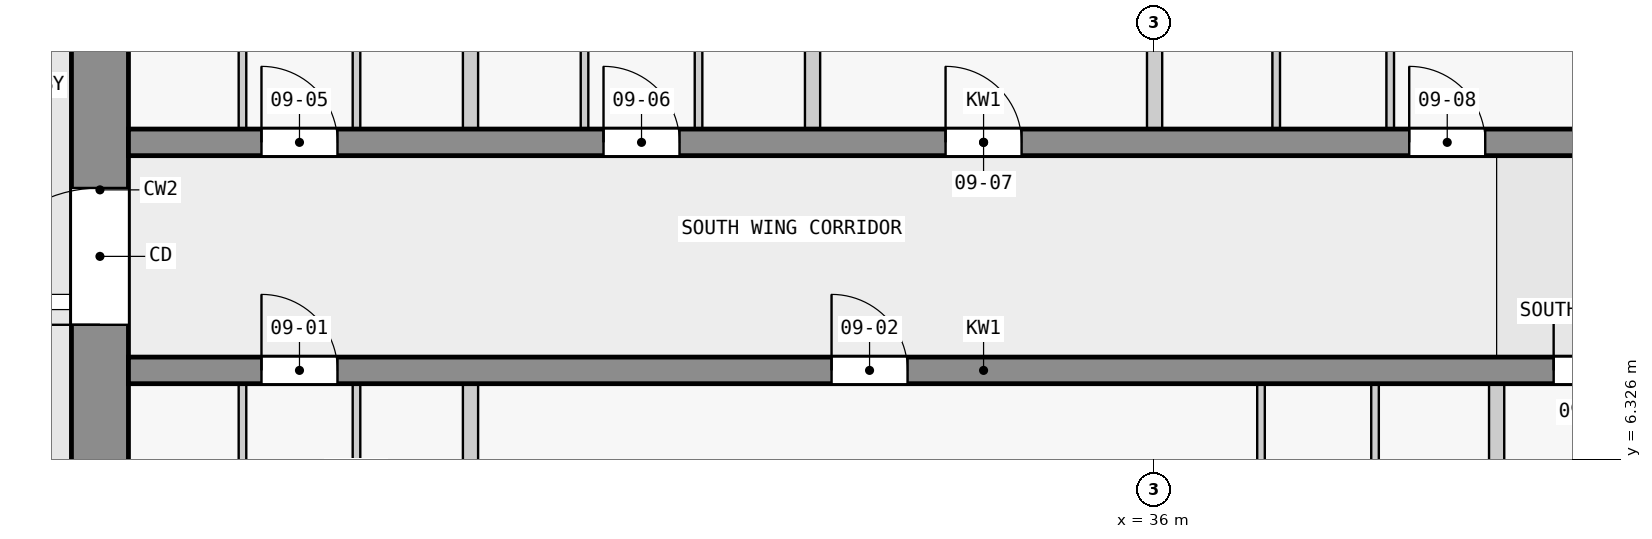
"""IFC4 building model, lengths in metres.
Left out: names, types, materials, properties, quantities, classifications, styles, units other than length and angle.
Written with IfcOpenShell. Run it as: python <this file> out.ifc"""

import sys

from ifc_helpers import new_model, si_unit, direction, frame, frame_2d, origin, place, context, subcontext, project, spatial, rectangle, extrude, element, fill, save


model = new_model("IFC4")
c1 = context("Model", 3, precision=1e-05, world=origin(), true_north=direction((0.0, 1.0)))
c2 = subcontext(c1, "Body", "Model", "MODEL_VIEW")
j1 = project(units=[si_unit("LENGTHUNIT", "METRE"), si_unit("PLANEANGLEUNIT", "RADIAN")], contexts=[c1])
p1 = place(None, origin())
s1 = spatial("IfcSite", under=j1, at=p1, CompositionType="ELEMENT")
p2 = place(p1, origin())
s2 = spatial("IfcBuilding", under=s1, at=p2, CompositionType="ELEMENT")
p3 = place(p2, frame((0.0, 0.0, 40.8)))
s3 = spatial("IfcBuildingStorey", under=s2, at=p3, CompositionType="ELEMENT", Elevation=40.8)
p4 = place(p3, frame((22.125, 2.5, 0.0), z_axis=(0.0, 0.0, 1.0), x_axis=(0.0, 1.0, 0.0)))
e1 = element("IfcWall", 1, at=p4, inside=s3, PredefinedType="SHEAR", context=c2, shape_type="SweptSolid", body=[
    extrude(rectangle(XDim=14.75, YDim=0.75, at=frame_2d((7.375, 0.0))), origin(), (0.0, 0.0, 1.0), 3.25),
])
p5 = place(p4, frame((5.6, 0.0, 0.0)))
e2 = element("IfcOpeningElement", 2, at=p5, cuts=e1, PredefinedType="OPENING", context=c2, shape_type="SweptSolid", body=[
    extrude(rectangle(XDim=1.8, YDim=2.1, at=frame_2d((0.9, 1.05))), frame((0.0, 0.385, 0.0), z_axis=(0.0, -1.0, 0.0), x_axis=(1.0, 0.0, 0.0)), (0.0, 0.0, 1.0), 0.77),
])
p6 = place(p3, frame((22.5, 7.5, 0.0), z_axis=(0.0, 0.0, 1.0), x_axis=(1.0, 0.0, 0.0)))
e3 = element("IfcWall", 3, at=p6, inside=s3, PredefinedType="SHEAR", context=c2, shape_type="SweptSolid", body=[
    extrude(rectangle(XDim=22.5, YDim=0.35, at=frame_2d((11.25, 0.0))), origin(), (0.0, 0.0, 1.0), 3.25),
])
p7 = place(p6, frame((1.75, 0.0, 0.0)))
e4 = element("IfcOpeningElement", 4, at=p7, cuts=e3, PredefinedType="OPENING", context=c2, shape_type="SweptSolid", body=[
    extrude(rectangle(XDim=1.0, YDim=2.1, at=frame_2d((0.5, 1.05))), frame((0.0, 0.185, 0.0), z_axis=(0.0, -1.0, 0.0), x_axis=(1.0, 0.0, 0.0)), (0.0, 0.0, 1.0), 0.37),
])
p8 = place(p6, frame((9.25, 0.0, 0.0)))
e5 = element("IfcOpeningElement", 5, at=p8, cuts=e3, PredefinedType="OPENING", context=c2, shape_type="SweptSolid", body=[
    extrude(rectangle(XDim=1.0, YDim=2.1, at=frame_2d((0.5, 1.05))), frame((0.0, 0.185, 0.0), z_axis=(0.0, -1.0, 0.0), x_axis=(1.0, 0.0, 0.0)), (0.0, 0.0, 1.0), 0.37),
])
p9 = place(p6, frame((18.75, 0.0, 0.0)))
e6 = element("IfcOpeningElement", 6, at=p9, cuts=e3, PredefinedType="OPENING", context=c2, shape_type="SweptSolid", body=[
    extrude(rectangle(XDim=0.9, YDim=2.1, at=frame_2d((0.45, 1.05))), frame((0.0, 0.185, 0.0), z_axis=(0.0, -1.0, 0.0), x_axis=(1.0, 0.0, 0.0)), (0.0, 0.0, 1.0), 0.37),
])
p10 = place(p6, frame((20.95, 0.0, 0.0)))
e7 = element("IfcOpeningElement", 7, at=p10, cuts=e3, PredefinedType="OPENING", context=c2, shape_type="SweptSolid", body=[
    extrude(rectangle(XDim=1.0, YDim=2.1, at=frame_2d((0.5, 1.05))), frame((0.0, 0.185, 0.0), z_axis=(0.0, -1.0, 0.0), x_axis=(1.0, 0.0, 0.0)), (0.0, 0.0, 1.0), 0.37),
])
p11 = place(p3, frame((22.5, 10.5, 0.0), z_axis=(0.0, 0.0, 1.0), x_axis=(1.0, 0.0, 0.0)))
e8 = element("IfcWall", 8, at=p11, inside=s3, PredefinedType="SHEAR", context=c2, shape_type="SweptSolid", body=[
    extrude(rectangle(XDim=22.5, YDim=0.35, at=frame_2d((11.25, 0.0))), origin(), (0.0, 0.0, 1.0), 3.25),
])
p12 = place(p11, frame((1.75, 0.0, 0.0)))
e9 = element("IfcOpeningElement", 9, at=p12, cuts=e8, PredefinedType="OPENING", context=c2, shape_type="SweptSolid", body=[
    extrude(rectangle(XDim=1.0, YDim=2.1, at=frame_2d((0.5, 1.05))), frame((0.0, 0.185, 0.0), z_axis=(0.0, -1.0, 0.0), x_axis=(1.0, 0.0, 0.0)), (0.0, 0.0, 1.0), 0.37),
])
p13 = place(p11, frame((6.25, 0.0, 0.0)))
e10 = element("IfcOpeningElement", 10, at=p13, cuts=e8, PredefinedType="OPENING", context=c2, shape_type="SweptSolid", body=[
    extrude(rectangle(XDim=1.0, YDim=2.1, at=frame_2d((0.5, 1.05))), frame((0.0, 0.185, 0.0), z_axis=(0.0, -1.0, 0.0), x_axis=(1.0, 0.0, 0.0)), (0.0, 0.0, 1.0), 0.37),
])
p14 = place(p11, frame((10.75, 0.0, 0.0)))
e11 = element("IfcOpeningElement", 11, at=p14, cuts=e8, PredefinedType="OPENING", context=c2, shape_type="SweptSolid", body=[
    extrude(rectangle(XDim=1.0, YDim=2.1, at=frame_2d((0.5, 1.05))), frame((0.0, 0.185, 0.0), z_axis=(0.0, -1.0, 0.0), x_axis=(1.0, 0.0, 0.0)), (0.0, 0.0, 1.0), 0.37),
])
p15 = place(p11, frame((16.85, 0.0, 0.0)))
e12 = element("IfcOpeningElement", 12, at=p15, cuts=e8, PredefinedType="OPENING", context=c2, shape_type="SweptSolid", body=[
    extrude(rectangle(XDim=1.0, YDim=2.1, at=frame_2d((0.5, 1.05))), frame((0.0, 0.185, 0.0), z_axis=(0.0, -1.0, 0.0), x_axis=(1.0, 0.0, 0.0)), (0.0, 0.0, 1.0), 0.37),
])
p16 = place(p3, frame((24.0, 3.925, 0.0), z_axis=(0.0, 0.0, 1.0), x_axis=(0.0, 1.0, 0.0)))
e13 = element("IfcWall", 13, at=p16, inside=s3, PredefinedType="PARTITIONING", context=c2, shape_type="SweptSolid", body=[
    extrude(rectangle(XDim=3.4, YDim=0.1, at=frame_2d((1.7, 0.0))), origin(), (0.0, 0.0, 1.0), 3.25),
])
p17 = place(p16, frame((1.25, 0.0, 0.0)))
e14 = element("IfcOpeningElement", 14, at=p17, cuts=e13, PredefinedType="OPENING", context=c2, shape_type="SweptSolid", body=[
    extrude(rectangle(XDim=0.9, YDim=2.1, at=frame_2d((0.45, 1.05))), frame((0.0, 0.06, 0.0), z_axis=(0.0, -1.0, 0.0), x_axis=(1.0, 0.0, 0.0)), (0.0, 0.0, 1.0), 0.12),
])
p18 = place(p3, frame((24.0, 10.675, 0.0), z_axis=(0.0, 0.0, 1.0), x_axis=(0.0, 1.0, 0.0)))
e15 = element("IfcWall", 15, at=p18, inside=s3, PredefinedType="PARTITIONING", context=c2, shape_type="SweptSolid", body=[
    extrude(rectangle(XDim=3.4, YDim=0.1, at=frame_2d((1.7, 0.0))), origin(), (0.0, 0.0, 1.0), 3.25),
])
p19 = place(p18, frame((1.25, 0.0, 0.0)))
e16 = element("IfcOpeningElement", 16, at=p19, cuts=e15, PredefinedType="OPENING", context=c2, shape_type="SweptSolid", body=[
    extrude(rectangle(XDim=0.9, YDim=2.1, at=frame_2d((0.45, 1.05))), frame((0.0, 0.06, 0.0), z_axis=(0.0, -1.0, 0.0), x_axis=(1.0, 0.0, 0.0)), (0.0, 0.0, 1.0), 0.12),
])
p20 = place(p3, frame((25.5, 7.325, 0.0), z_axis=(0.0, 0.0, 1.0), x_axis=(0.0, -1.0, 0.0)))
e17 = element("IfcWall", 17, at=p20, inside=s3, PredefinedType="PARTITIONING", context=c2, shape_type="SweptSolid", body=[
    extrude(rectangle(XDim=3.4, YDim=0.1, at=frame_2d((1.7, 0.0))), origin(), (0.0, 0.0, 1.0), 3.25),
])
p21 = place(p20, frame((1.25, 0.0, 0.0)))
e18 = element("IfcOpeningElement", 18, at=p21, cuts=e17, PredefinedType="OPENING", context=c2, shape_type="SweptSolid", body=[
    extrude(rectangle(XDim=0.9, YDim=2.1, at=frame_2d((0.45, 1.05))), frame((0.0, 0.06, 0.0), z_axis=(0.0, -1.0, 0.0), x_axis=(1.0, 0.0, 0.0)), (0.0, 0.0, 1.0), 0.12),
])
p22 = place(p3, frame((25.5, 14.075, 0.0), z_axis=(0.0, 0.0, 1.0), x_axis=(0.0, -1.0, 0.0)))
e19 = element("IfcWall", 19, at=p22, inside=s3, PredefinedType="PARTITIONING", context=c2, shape_type="SweptSolid", body=[
    extrude(rectangle(XDim=3.4, YDim=0.1, at=frame_2d((1.7, 0.0))), origin(), (0.0, 0.0, 1.0), 3.25),
])
p23 = place(p22, frame((1.25, 0.0, 0.0)))
e20 = element("IfcOpeningElement", 20, at=p23, cuts=e19, PredefinedType="OPENING", context=c2, shape_type="SweptSolid", body=[
    extrude(rectangle(XDim=0.9, YDim=2.1, at=frame_2d((0.45, 1.05))), frame((0.0, 0.06, 0.0), z_axis=(0.0, -1.0, 0.0), x_axis=(1.0, 0.0, 0.0)), (0.0, 0.0, 1.0), 0.12),
])
for number, where, z_axis, x_axis in (
    (21, (27.0, 3.925, 0.0), (0.0, 0.0, 1.0), (0.0, 1.0, 0.0)),
    (22, (27.0, 10.675, 0.0), (0.0, 0.0, 1.0), (0.0, 1.0, 0.0)),
):
    element("IfcWall", number, at=place(p3, frame(where, z_axis=z_axis, x_axis=x_axis)), inside=s3, PredefinedType="PARTITIONING", context=c2, shape_type="SweptSolid", body=[
        extrude(rectangle(XDim=3.4, YDim=0.2, at=frame_2d((1.7, 0.0))), origin(), (0.0, 0.0, 1.0), 3.25),
    ])
p24 = place(p3, frame((28.5, 10.675, 0.0), z_axis=(0.0, 0.0, 1.0), x_axis=(0.0, 1.0, 0.0)))
e23 = element("IfcWall", 23, at=p24, inside=s3, PredefinedType="PARTITIONING", context=c2, shape_type="SweptSolid", body=[
    extrude(rectangle(XDim=3.4, YDim=0.1, at=frame_2d((1.7, 0.0))), origin(), (0.0, 0.0, 1.0), 3.25),
])
p25 = place(p24, frame((1.25, 0.0, 0.0)))
e24 = element("IfcOpeningElement", 24, at=p25, cuts=e23, PredefinedType="OPENING", context=c2, shape_type="SweptSolid", body=[
    extrude(rectangle(XDim=0.9, YDim=2.1, at=frame_2d((0.45, 1.05))), frame((0.0, 0.06, 0.0), z_axis=(0.0, -1.0, 0.0), x_axis=(1.0, 0.0, 0.0)), (0.0, 0.0, 1.0), 0.12),
])
p26 = place(p3, frame((30.0, 14.075, 0.0), z_axis=(0.0, 0.0, 1.0), x_axis=(0.0, -1.0, 0.0)))
e25 = element("IfcWall", 25, at=p26, inside=s3, PredefinedType="PARTITIONING", context=c2, shape_type="SweptSolid", body=[
    extrude(rectangle(XDim=3.4, YDim=0.1, at=frame_2d((1.7, 0.0))), origin(), (0.0, 0.0, 1.0), 3.25),
])
p27 = place(p26, frame((1.25, 0.0, 0.0)))
e26 = element("IfcOpeningElement", 26, at=p27, cuts=e25, PredefinedType="OPENING", context=c2, shape_type="SweptSolid", body=[
    extrude(rectangle(XDim=0.9, YDim=2.1, at=frame_2d((0.45, 1.05))), frame((0.0, 0.06, 0.0), z_axis=(0.0, -1.0, 0.0), x_axis=(1.0, 0.0, 0.0)), (0.0, 0.0, 1.0), 0.12),
])
p28 = place(p3, frame((31.5, 10.675, 0.0), z_axis=(0.0, 0.0, 1.0), x_axis=(0.0, 1.0, 0.0)))
e27 = element("IfcWall", 27, at=p28, inside=s3, PredefinedType="PARTITIONING", context=c2, shape_type="SweptSolid", body=[
    extrude(rectangle(XDim=3.4, YDim=0.2, at=frame_2d((1.7, 0.0))), origin(), (0.0, 0.0, 1.0), 3.25),
])
p29 = place(p3, frame((36.0, 10.675, 0.0), z_axis=(0.0, 0.0, 1.0), x_axis=(0.0, 1.0, 0.0)))
e28 = element("IfcWall", 28, at=p29, inside=s3, PredefinedType="PARTITIONING", context=c2, shape_type="SweptSolid", body=[
    extrude(rectangle(XDim=5.925, YDim=0.2, at=frame_2d((2.962, 0.0))), origin(), (0.0, 0.0, 1.0), 3.25),
])
p30 = place(p3, frame((37.4, 7.325, 0.0), z_axis=(0.0, 0.0, 1.0), x_axis=(0.0, -1.0, 0.0)))
e29 = element("IfcWall", 29, at=p30, inside=s3, PredefinedType="PARTITIONING", context=c2, shape_type="SweptSolid", body=[
    extrude(rectangle(XDim=3.4, YDim=0.1, at=frame_2d((1.7, 0.0))), origin(), (0.0, 0.0, 1.0), 3.25),
])
p31 = place(p30, frame((1.25, 0.0, 0.0)))
e30 = element("IfcOpeningElement", 30, at=p31, cuts=e29, PredefinedType="OPENING", context=c2, shape_type="SweptSolid", body=[
    extrude(rectangle(XDim=0.9, YDim=2.1, at=frame_2d((0.45, 1.05))), frame((0.0, 0.06, 0.0), z_axis=(0.0, -1.0, 0.0), x_axis=(1.0, 0.0, 0.0)), (0.0, 0.0, 1.0), 0.12),
])
for number, where, z_axis, x_axis in (
    (31, (37.6, 10.675, 0.0), (0.0, 0.0, 1.0), (0.0, 1.0, 0.0)),
    (32, (38.9, 3.925, 0.0), (0.0, 0.0, 1.0), (0.0, 1.0, 0.0)),
):
    element("IfcWall", number, at=place(p3, frame(where, z_axis=z_axis, x_axis=x_axis)), inside=s3, PredefinedType="PARTITIONING", context=c2, shape_type="SweptSolid", body=[
        extrude(rectangle(XDim=3.4, YDim=0.1, at=frame_2d((1.7, 0.0))), origin(), (0.0, 0.0, 1.0), 3.25),
    ])
p32 = place(p3, frame((39.1, 10.675, 0.0), z_axis=(0.0, 0.0, 1.0), x_axis=(0.0, 1.0, 0.0)))
e33 = element("IfcWall", 33, at=p32, inside=s3, PredefinedType="PARTITIONING", context=c2, shape_type="SweptSolid", body=[
    extrude(rectangle(XDim=3.4, YDim=0.1, at=frame_2d((1.7, 0.0))), origin(), (0.0, 0.0, 1.0), 3.25),
])
p33 = place(p32, frame((1.25, 0.0, 0.0)))
e34 = element("IfcOpeningElement", 34, at=p33, cuts=e33, PredefinedType="OPENING", context=c2, shape_type="SweptSolid", body=[
    extrude(rectangle(XDim=0.9, YDim=2.1, at=frame_2d((0.45, 1.05))), frame((0.0, 0.06, 0.0), z_axis=(0.0, -1.0, 0.0), x_axis=(1.0, 0.0, 0.0)), (0.0, 0.0, 1.0), 0.12),
])
p34 = place(p3, frame((40.5, 3.925, 0.0), z_axis=(0.0, 0.0, 1.0), x_axis=(0.0, 1.0, 0.0)))
e35 = element("IfcWall", 35, at=p34, inside=s3, PredefinedType="PARTITIONING", context=c2, shape_type="SweptSolid", body=[
    extrude(rectangle(XDim=3.4, YDim=0.2, at=frame_2d((1.7, 0.0))), origin(), (0.0, 0.0, 1.0), 3.25),
])
p35 = place(p5, origin())
e36 = element("IfcDoor", 36, at=p35, inside=s3, OperationType="DOUBLE_DOOR_SINGLE_SWING", PredefinedType="DOOR", context=c2, shape_type="SweptSolid", body=[
    extrude(rectangle(XDim=1.8, YDim=2.1, at=frame_2d((0.9, 1.05))), frame((0.0, 0.025, 0.0), z_axis=(0.0, -1.0, 0.0), x_axis=(1.0, 0.0, 0.0)), (0.0, 0.0, 1.0), 0.05),
])
fill(e2, e36)
p36 = place(p7, origin())
e37 = element("IfcDoor", 37, at=p36, inside=s3, OperationType="SINGLE_SWING_LEFT", PredefinedType="DOOR", context=c2, shape_type="SweptSolid", body=[
    extrude(rectangle(XDim=1.0, YDim=2.1, at=frame_2d((0.5, 1.05))), frame((0.0, 0.025, 0.0), z_axis=(0.0, -1.0, 0.0), x_axis=(1.0, 0.0, 0.0)), (0.0, 0.0, 1.0), 0.05),
])
fill(e4, e37)
p37 = place(p8, origin())
e38 = element("IfcDoor", 38, at=p37, inside=s3, OperationType="SINGLE_SWING_LEFT", PredefinedType="DOOR", context=c2, shape_type="SweptSolid", body=[
    extrude(rectangle(XDim=1.0, YDim=2.1, at=frame_2d((0.5, 1.05))), frame((0.0, 0.025, 0.0), z_axis=(0.0, -1.0, 0.0), x_axis=(1.0, 0.0, 0.0)), (0.0, 0.0, 1.0), 0.05),
])
fill(e5, e38)
p38 = place(p9, origin())
e39 = element("IfcDoor", 39, at=p38, inside=s3, OperationType="SINGLE_SWING_RIGHT", PredefinedType="DOOR", context=c2, shape_type="SweptSolid", body=[
    extrude(rectangle(XDim=0.9, YDim=2.1, at=frame_2d((0.45, 1.05))), frame((0.0, 0.025, 0.0), z_axis=(0.0, -1.0, 0.0), x_axis=(1.0, 0.0, 0.0)), (0.0, 0.0, 1.0), 0.05),
])
fill(e6, e39)
p39 = place(p12, origin())
e40 = element("IfcDoor", 40, at=p39, inside=s3, OperationType="SINGLE_SWING_LEFT", PredefinedType="DOOR", context=c2, shape_type="SweptSolid", body=[
    extrude(rectangle(XDim=1.0, YDim=2.1, at=frame_2d((0.5, 1.05))), frame((0.0, 0.025, 0.0), z_axis=(0.0, -1.0, 0.0), x_axis=(1.0, 0.0, 0.0)), (0.0, 0.0, 1.0), 0.05),
])
fill(e9, e40)
p40 = place(p13, origin())
e41 = element("IfcDoor", 41, at=p40, inside=s3, OperationType="SINGLE_SWING_LEFT", PredefinedType="DOOR", context=c2, shape_type="SweptSolid", body=[
    extrude(rectangle(XDim=1.0, YDim=2.1, at=frame_2d((0.5, 1.05))), frame((0.0, 0.025, 0.0), z_axis=(0.0, -1.0, 0.0), x_axis=(1.0, 0.0, 0.0)), (0.0, 0.0, 1.0), 0.05),
])
fill(e10, e41)
p41 = place(p14, origin())
e42 = element("IfcDoor", 42, at=p41, inside=s3, OperationType="SINGLE_SWING_LEFT", PredefinedType="DOOR", context=c2, shape_type="SweptSolid", body=[
    extrude(rectangle(XDim=1.0, YDim=2.1, at=frame_2d((0.5, 1.05))), frame((0.0, 0.025, 0.0), z_axis=(0.0, -1.0, 0.0), x_axis=(1.0, 0.0, 0.0)), (0.0, 0.0, 1.0), 0.05),
])
fill(e11, e42)
p42 = place(p15, origin())
e43 = element("IfcDoor", 43, at=p42, inside=s3, OperationType="SINGLE_SWING_RIGHT", PredefinedType="DOOR", context=c2, shape_type="SweptSolid", body=[
    extrude(rectangle(XDim=1.0, YDim=2.1, at=frame_2d((0.5, 1.05))), frame((0.0, 0.025, 0.0), z_axis=(0.0, -1.0, 0.0), x_axis=(1.0, 0.0, 0.0)), (0.0, 0.0, 1.0), 0.05),
])
fill(e12, e43)
save(model, sys.argv[1])
